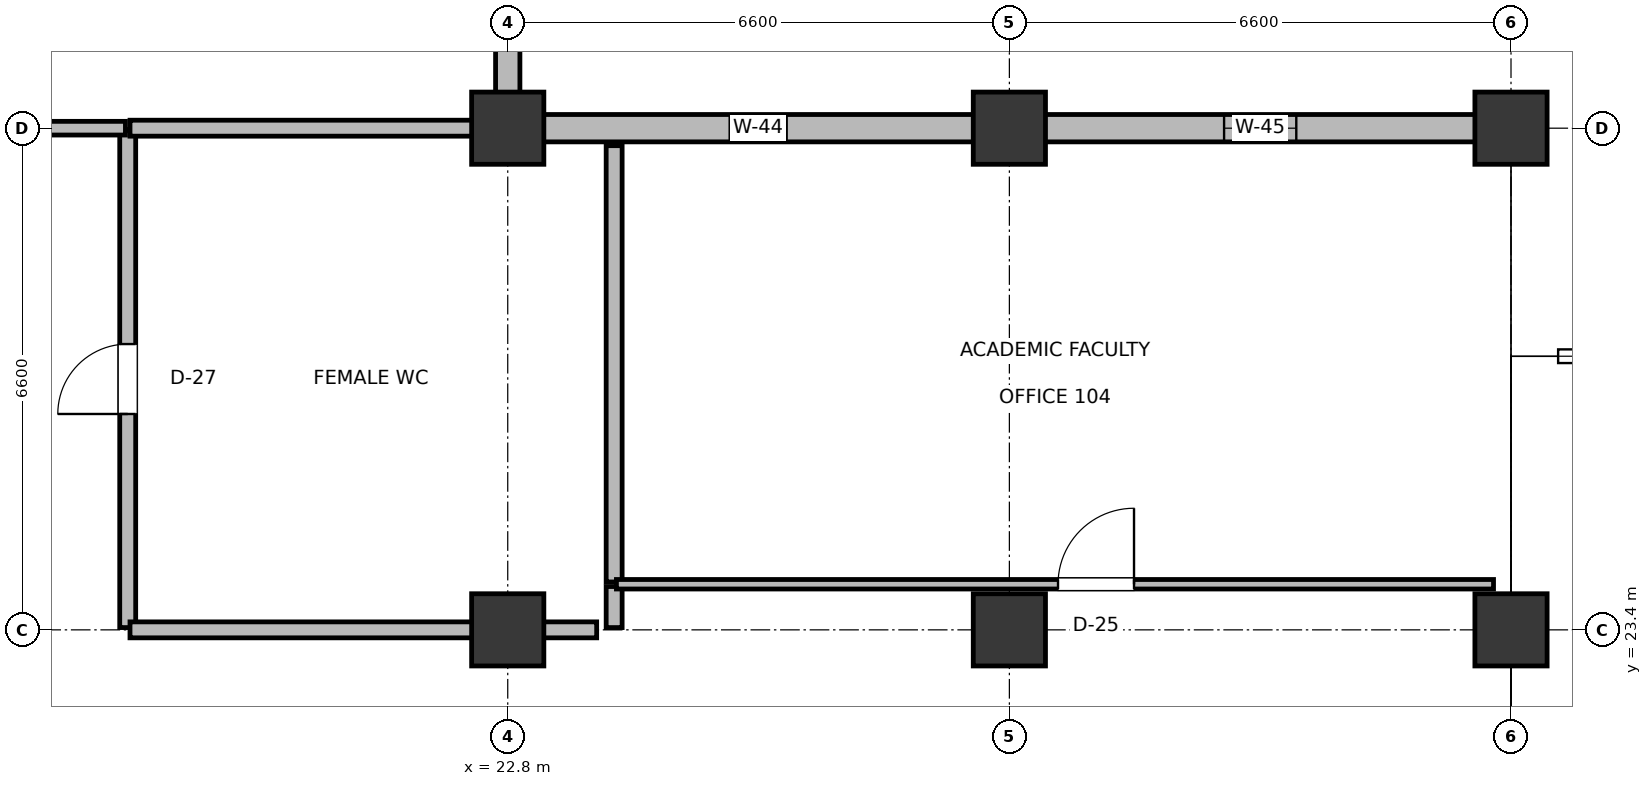
"""IFC4 building model, lengths in metres.
Left out: names, types, materials, properties, quantities, classifications, styles, units other than length and angle.
Written with IfcOpenShell. Run it as: python <this file> out.ifc"""

import sys

from ifc_helpers import new_model, si_unit, direction, frame, frame_2d, origin, origin_2d, place, context, subcontext, project, spatial, rectangle, extrude, element, fill, save


model = new_model("IFC4")
c1 = context("Model", 3, precision=1e-05, world=origin(), true_north=direction((0.0, 1.0)))
c2 = subcontext(c1, "Body", "Model", "MODEL_VIEW")
j1 = project(units=[si_unit("LENGTHUNIT", "METRE"), si_unit("PLANEANGLEUNIT", "RADIAN")], contexts=[c1])
p1 = place(None, origin())
s1 = spatial("IfcSite", under=j1, at=p1, CompositionType="ELEMENT")
p2 = place(p1, origin())
s2 = spatial("IfcBuilding", under=s1, at=p2, CompositionType="ELEMENT")
p3 = place(p2, frame((0.0, 0.0, 5.4)))
s3 = spatial("IfcBuildingStorey", under=s2, at=p3, CompositionType="ELEMENT", Elevation=5.4)
for number, where, z_axis, x_axis in (
    (1, (22.8, 23.4, 0.0), (0.0, 0.0, 1.0), (1.0, 0.0, 0.0)),
    (2, (22.8, 30.0, 0.0), (0.0, 0.0, 1.0), (1.0, 0.0, 0.0)),
    (3, (29.4, 23.4, 0.0), (0.0, 0.0, 1.0), (1.0, 0.0, 0.0)),
    (4, (29.4, 30.0, 0.0), (0.0, 0.0, 1.0), (1.0, 0.0, 0.0)),
    (5, (36.0, 23.4, 0.0), (0.0, 0.0, 1.0), (1.0, 0.0, 0.0)),
    (6, (36.0, 30.0, 0.0), (0.0, 0.0, 1.0), (1.0, 0.0, 0.0)),
):
    element("IfcColumn", number, at=place(p3, frame(where, z_axis=z_axis, x_axis=x_axis)), inside=s3, PredefinedType="COLUMN", context=c2, shape_type="SweptSolid", body=[
        extrude(rectangle(XDim=0.95, YDim=0.95, at=origin_2d()), origin(), (0.0, 0.0, 1.0), 4.8),
    ])
p4 = place(p3, frame((23.255, 30.0, 0.0), z_axis=(0.0, 0.0, 1.0), x_axis=(1.0, 0.0, 0.0)))
e7 = element("IfcWall", 7, at=p4, inside=s3, PredefinedType="SOLIDWALL", context=c2, shape_type="SweptSolid", body=[
    extrude(rectangle(XDim=5.68, YDim=0.36, at=frame_2d((2.84, 0.0))), origin(), (0.0, 0.0, 1.0), 3.755),
])
p5 = place(p4, frame((2.465, 0.0, 0.9)))
e8 = element("IfcOpeningElement", 8, at=p5, cuts=e7, PredefinedType="OPENING", context=c2, shape_type="SweptSolid", body=[
    extrude(rectangle(XDim=0.75, YDim=1.75, at=frame_2d((0.375, 0.875))), frame((0.0, 0.19, 0.0), z_axis=(0.0, -1.0, 0.0), x_axis=(1.0, 0.0, 0.0)), (0.0, 0.0, 1.0), 0.38),
])
p6 = place(p3, frame((29.855, 30.0, 0.0), z_axis=(0.0, 0.0, 1.0), x_axis=(1.0, 0.0, 0.0)))
e9 = element("IfcWall", 9, at=p6, inside=s3, PredefinedType="SOLIDWALL", context=c2, shape_type="SweptSolid", body=[
    extrude(rectangle(XDim=5.69, YDim=0.36, at=frame_2d((2.845, 0.0))), origin(), (0.0, 0.0, 1.0), 3.825),
])
p7 = place(p6, frame((2.37, 0.0, 0.9)))
e10 = element("IfcOpeningElement", 10, at=p7, cuts=e9, PredefinedType="OPENING", context=c2, shape_type="SweptSolid", body=[
    extrude(rectangle(XDim=0.95, YDim=1.15, at=frame_2d((0.475, 0.575))), frame((0.0, 0.19, 0.0), z_axis=(0.0, -1.0, 0.0), x_axis=(1.0, 0.0, 0.0)), (0.0, 0.0, 1.0), 0.38),
])
p8 = place(p3, frame((22.8, 30.455, 0.0), z_axis=(0.0, 0.0, 1.0), x_axis=(0.0, 1.0, 0.0)))
e11 = element("IfcWall", 11, at=p8, inside=s3, PredefinedType="SOLIDWALL", context=c2, shape_type="SweptSolid", body=[
    extrude(rectangle(XDim=8.11, YDim=0.32, at=frame_2d((4.055, 0.0))), origin(), (0.0, 0.0, 1.0), 3.825),
])
p9 = place(p8, frame((3.18, 0.0, 0.9)))
e12 = element("IfcOpeningElement", 12, at=p9, cuts=e11, PredefinedType="OPENING", context=c2, shape_type="SweptSolid", body=[
    extrude(rectangle(XDim=1.75, YDim=1.15, at=frame_2d((0.875, 0.575))), frame((0.0, 0.17, 0.0), z_axis=(0.0, -1.0, 0.0), x_axis=(1.0, 0.0, 0.0)), (0.0, 0.0, 1.0), 0.34),
])
p10 = place(p3, frame((24.2, 24.03, 0.0), z_axis=(0.0, 0.0, 1.0), x_axis=(0.0, 1.0, 0.0)))
e13 = element("IfcWall", 13, at=p10, inside=s3, PredefinedType="PLUMBINGWALL", context=c2, shape_type="SweptSolid", body=[
    extrude(rectangle(XDim=5.74, YDim=0.21, at=frame_2d((2.87, 0.0))), origin(), (0.0, 0.0, 1.0), 3.755),
])
p11 = place(p3, frame((24.2, 23.43, 0.0), z_axis=(0.0, 0.0, 1.0), x_axis=(0.0, 1.0, 0.0)))
e14 = element("IfcWall", 14, at=p11, inside=s3, PredefinedType="PLUMBINGWALL", context=c2, shape_type="SweptSolid", body=[
    extrude(rectangle(XDim=0.54, YDim=0.21, at=frame_2d((0.27, 0.0))), origin(), (0.0, 0.0, 1.0), 3.825),
])
p12 = place(p3, frame((17.8, 23.43, 0.0), z_axis=(0.0, 0.0, 1.0), x_axis=(0.0, 1.0, 0.0)))
e15 = element("IfcWall", 15, at=p12, inside=s3, PredefinedType="PLUMBINGWALL", context=c2, shape_type="SweptSolid", body=[
    extrude(rectangle(XDim=6.54, YDim=0.21, at=frame_2d((3.27, 0.0))), origin(), (0.0, 0.0, 1.0), 3.725),
])
p13 = place(p12, frame((2.81, 0.0, 0.0)))
e16 = element("IfcOpeningElement", 16, at=p13, cuts=e15, PredefinedType="OPENING", context=c2, shape_type="SweptSolid", body=[
    extrude(rectangle(XDim=0.92, YDim=2.1, at=frame_2d((0.46, 1.05))), frame((0.0, 0.115, 0.0), z_axis=(0.0, -1.0, 0.0), x_axis=(1.0, 0.0, 0.0)), (0.0, 0.0, 1.0), 0.23),
])
p14 = place(p3, frame((17.83, 23.4, 0.0), z_axis=(0.0, 0.0, 1.0), x_axis=(1.0, 0.0, 0.0)))
e17 = element("IfcWall", 17, at=p14, inside=s3, PredefinedType="PLUMBINGWALL", context=c2, shape_type="SweptSolid", body=[
    extrude(rectangle(XDim=6.14, YDim=0.21, at=frame_2d((3.07, 0.0))), origin(), (0.0, 0.0, 1.0), 3.825),
])
p15 = place(p3, frame((17.83, 30.0, 0.0), z_axis=(0.0, 0.0, 1.0), x_axis=(1.0, 0.0, 0.0)))
e18 = element("IfcWall", 18, at=p15, inside=s3, PredefinedType="PLUMBINGWALL", context=c2, shape_type="SweptSolid", body=[
    extrude(rectangle(XDim=4.74, YDim=0.21, at=frame_2d((2.37, 0.0))), origin(), (0.0, 0.0, 1.0), 3.725),
])
p16 = place(p3, frame((24.23, 24.0, 0.0), z_axis=(0.0, 0.0, 1.0), x_axis=(1.0, 0.0, 0.0)))
e19 = element("IfcWall", 19, at=p16, inside=s3, PredefinedType="PARTITIONING", context=c2, shape_type="SweptSolid", body=[
    extrude(rectangle(XDim=11.54, YDim=0.125, at=frame_2d((5.77, 0.0))), origin(), (0.0, 0.0, 1.0), 3.905),
])
p17 = place(p16, frame((5.81, 0.0, 0.0)))
e20 = element("IfcOpeningElement", 20, at=p17, cuts=e19, PredefinedType="OPENING", context=c2, shape_type="SweptSolid", body=[
    extrude(rectangle(XDim=1.0, YDim=2.15, at=frame_2d((0.5, 1.075))), frame((0.0, 0.073, 0.0), z_axis=(0.0, -1.0, 0.0), x_axis=(1.0, 0.0, 0.0)), (0.0, 0.0, 1.0), 0.145),
])
p18 = place(p3, frame((13.43, 30.0, 0.0), z_axis=(0.0, 0.0, 1.0), x_axis=(1.0, 0.0, 0.0)))
e21 = element("IfcWall", 21, at=p18, inside=s3, PredefinedType="PARTITIONING", context=c2, shape_type="SweptSolid", body=[
    extrude(rectangle(XDim=4.34, YDim=0.18, at=frame_2d((2.17, 0.0))), origin(), (0.0, 0.0, 1.0), 3.695),
])
p19 = place(p18, frame((1.105, 0.0, 0.0)))
e22 = element("IfcOpeningElement", 22, at=p19, cuts=e21, PredefinedType="OPENING", context=c2, shape_type="SweptSolid", body=[
    extrude(rectangle(XDim=1.05, YDim=2.2, at=frame_2d((0.525, 1.1))), frame((0.0, 0.1, 0.0), z_axis=(0.0, -1.0, 0.0), x_axis=(1.0, 0.0, 0.0)), (0.0, 0.0, 1.0), 0.2),
])
p20 = place(p5, origin())
e23 = element("IfcWindow", 23, at=p20, inside=s3, PartitioningType="DOUBLE_PANEL_VERTICAL", PredefinedType="WINDOW", context=c2, shape_type="SweptSolid", body=[
    extrude(rectangle(XDim=0.75, YDim=1.75, at=frame_2d((0.375, 0.875))), frame((0.0, 0.03, 0.0), z_axis=(0.0, -1.0, 0.0), x_axis=(1.0, 0.0, 0.0)), (0.0, 0.0, 1.0), 0.06),
])
fill(e8, e23)
p21 = place(p7, origin())
e24 = element("IfcWindow", 24, at=p21, inside=s3, PartitioningType="DOUBLE_PANEL_VERTICAL", PredefinedType="WINDOW", context=c2, shape_type="SweptSolid", body=[
    extrude(rectangle(XDim=0.95, YDim=1.15, at=frame_2d((0.475, 0.575))), frame((0.0, 0.03, 0.0), z_axis=(0.0, -1.0, 0.0), x_axis=(1.0, 0.0, 0.0)), (0.0, 0.0, 1.0), 0.06),
])
fill(e10, e24)
p22 = place(p13, origin())
e25 = element("IfcDoor", 25, at=p22, inside=s3, OperationType="SINGLE_SWING_LEFT", PredefinedType="DOOR", context=c2, shape_type="SweptSolid", body=[
    extrude(rectangle(XDim=0.92, YDim=2.1, at=frame_2d((0.46, 1.05))), frame((0.0, 0.025, 0.0), z_axis=(0.0, -1.0, 0.0), x_axis=(1.0, 0.0, 0.0)), (0.0, 0.0, 1.0), 0.05),
])
fill(e16, e25)
p23 = place(p17, origin())
e26 = element("IfcDoor", 26, at=p23, inside=s3, OperationType="SINGLE_SWING_RIGHT", PredefinedType="DOOR", context=c2, shape_type="SweptSolid", body=[
    extrude(rectangle(XDim=1.0, YDim=2.15, at=frame_2d((0.5, 1.075))), frame((0.0, 0.025, 0.0), z_axis=(0.0, -1.0, 0.0), x_axis=(1.0, 0.0, 0.0)), (0.0, 0.0, 1.0), 0.05),
])
fill(e20, e26)
save(model, sys.argv[1])
